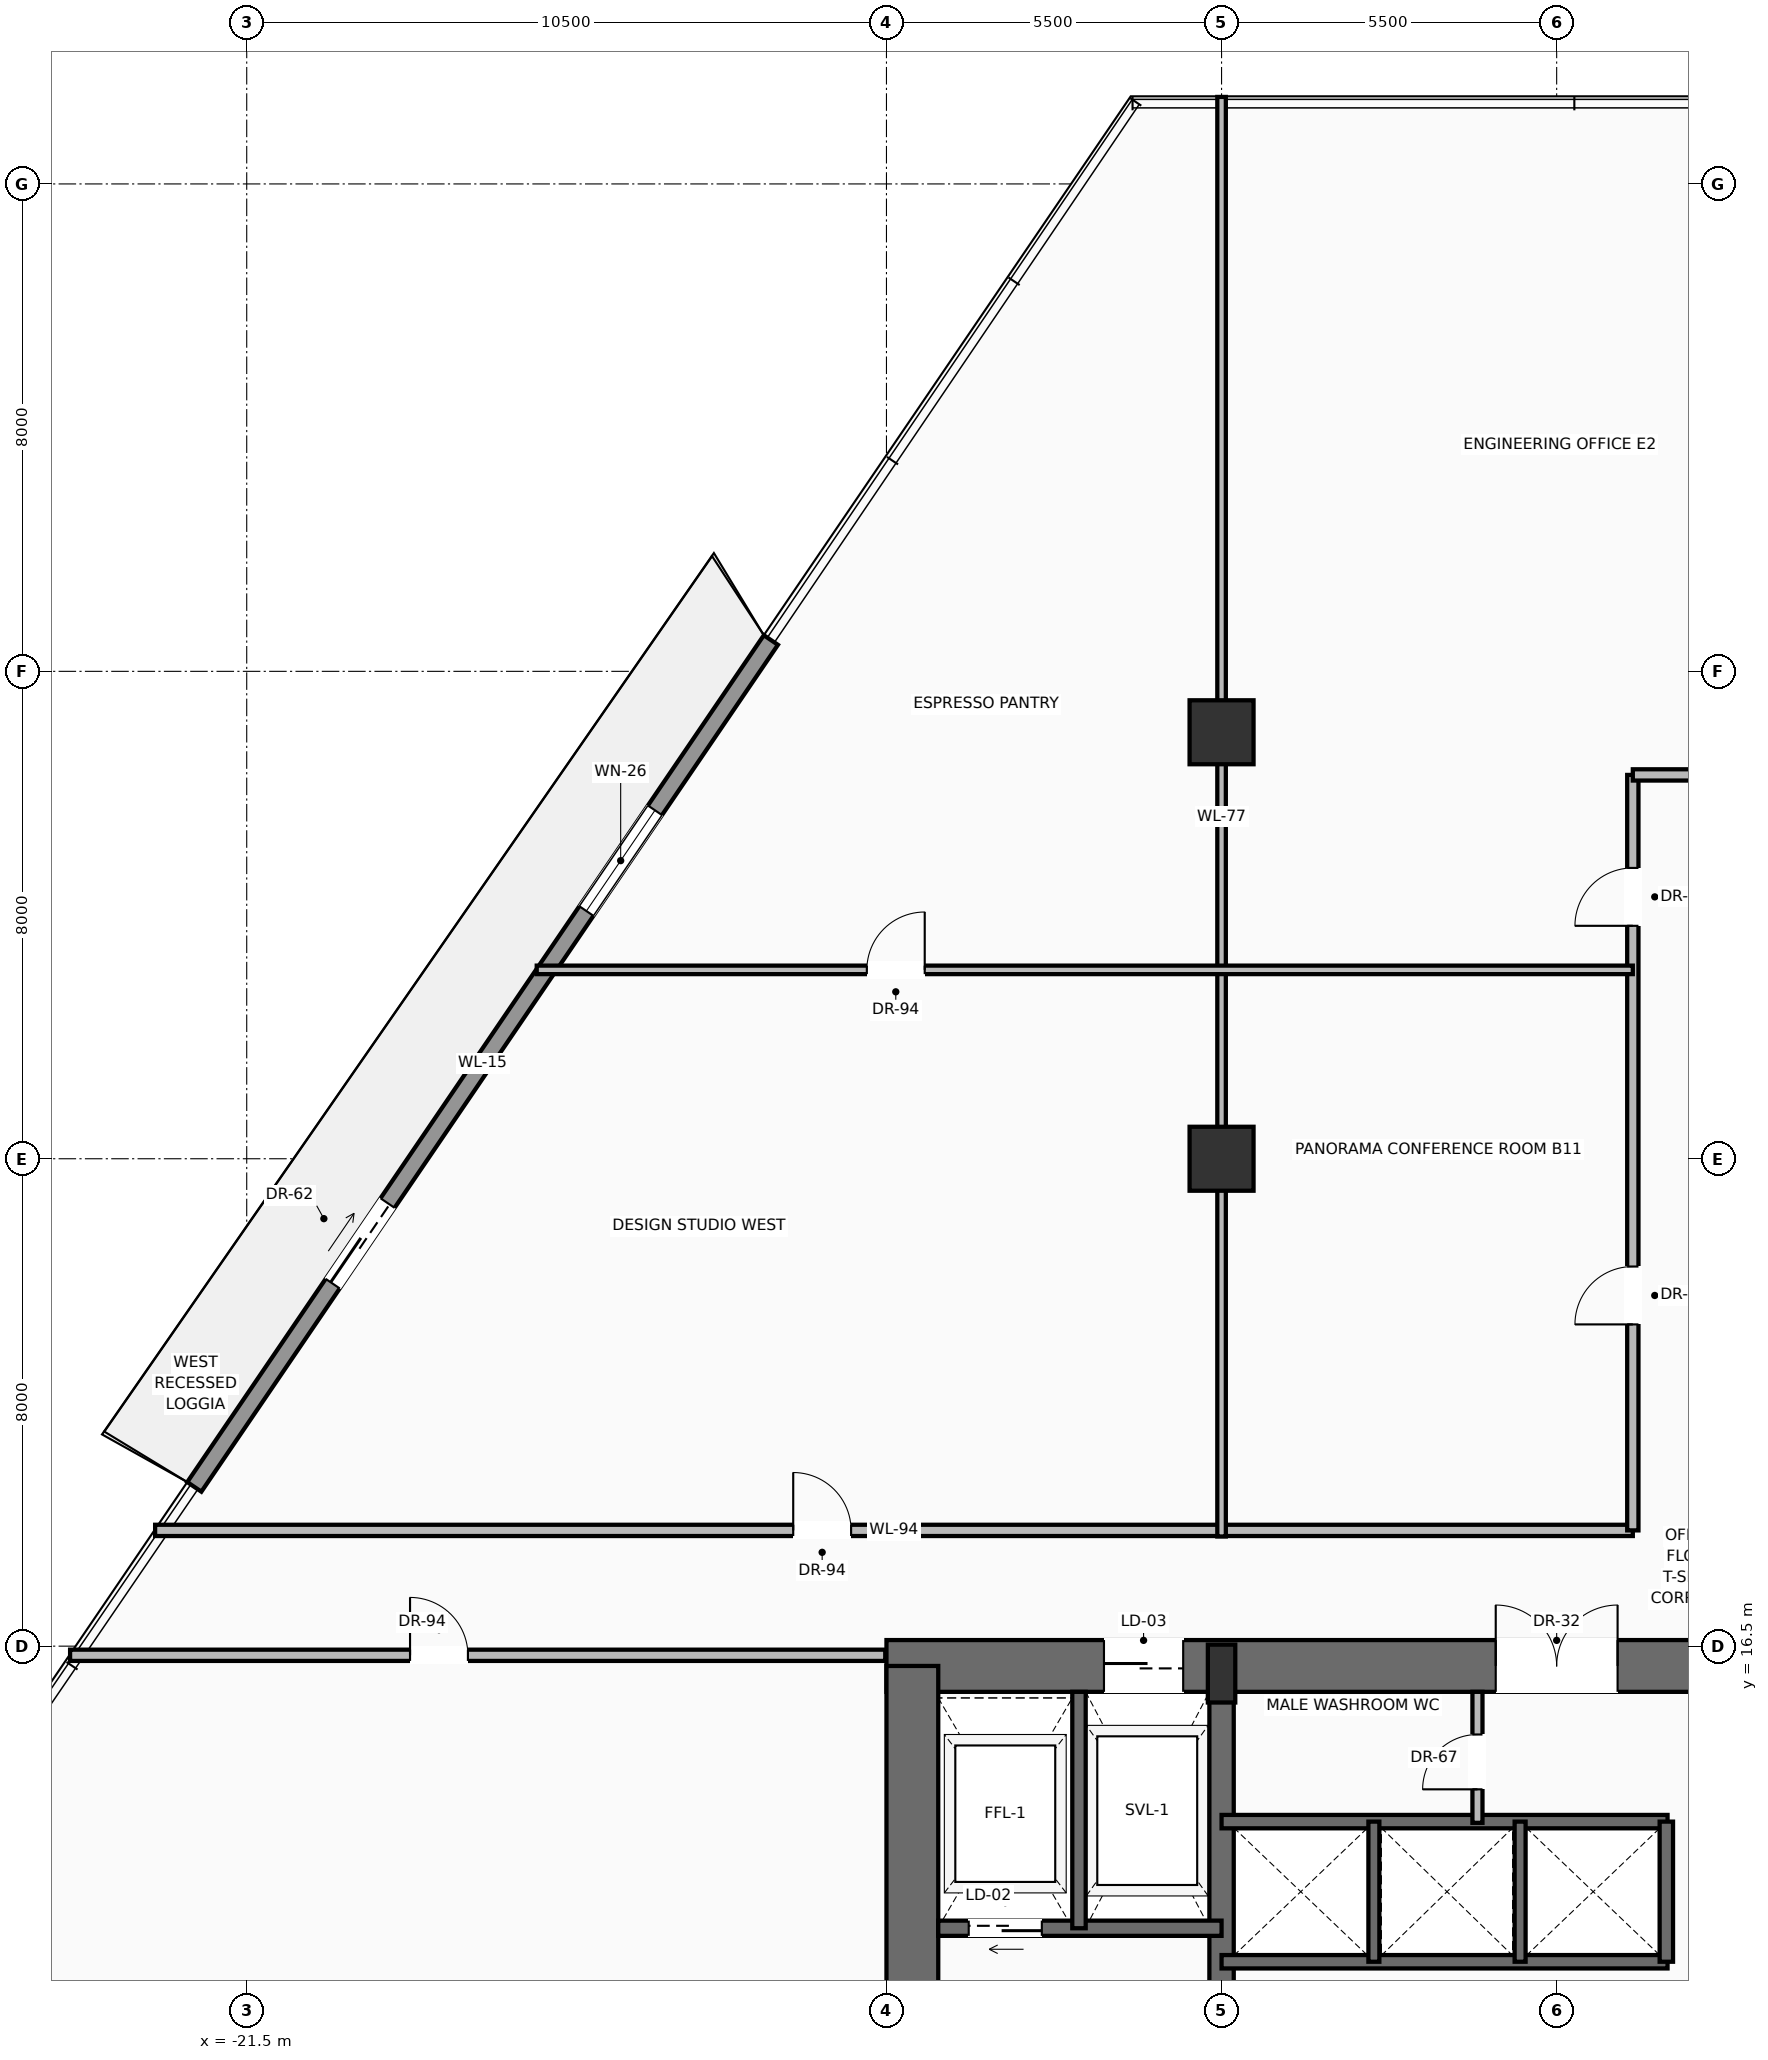
"""IFC4 building model, lengths in metres.
Left out: names, types, materials, properties, quantities, classifications, styles, units other than length and angle.
Written with IfcOpenShell. Run it as: python <this file> out.ifc"""

import sys

from ifc_helpers import new_model, si_unit, direction, frame, frame_2d, origin, origin_2d, place, context, subcontext, project, spatial, rectangle, extrude, source, transform, mapped, element, fill, save


model = new_model("IFC4")
c1 = context("Model", 3, precision=1e-05, world=origin(), true_north=direction((0.0, 1.0)))
c2 = subcontext(c1, "Body", "Model", "MODEL_VIEW")
j1 = project(units=[si_unit("LENGTHUNIT", "METRE"), si_unit("PLANEANGLEUNIT", "RADIAN")], contexts=[c1])
p1 = place(None, origin())
s1 = spatial("IfcSite", under=j1, at=p1, CompositionType="ELEMENT")
p2 = place(p1, origin())
s2 = spatial("IfcBuilding", under=s1, at=p2, CompositionType="ELEMENT")
p3 = place(p2, frame((0.0, 0.0, 53.4)))
s3 = spatial("IfcBuildingStorey", under=s2, at=p3, CompositionType="ELEMENT", Elevation=53.4)
p4 = place(p3, frame((-11.0, 16.175, 0.0), z_axis=(0.0, 0.0, 1.0), x_axis=(1.0, 0.0, 0.0)))
e1 = element("IfcWall", 1, at=p4, inside=s3, PredefinedType="SHEAR", context=c2, shape_type="SweptSolid", body=[
    extrude(rectangle(XDim=22.0, YDim=0.85, at=frame_2d((11.0, 0.0))), origin(), (0.0, 0.0, 1.0), 3.45),
])
p5 = place(p4, frame((3.57, 0.0, 0.0)))
e2 = element("IfcOpeningElement", 2, at=p5, cuts=e1, PredefinedType="OPENING", context=c2, shape_type="SweptSolid", body=[
    extrude(rectangle(XDim=1.3, YDim=2.3, at=frame_2d((0.65, 1.15))), frame((0.0, 0.435, 0.0), z_axis=(0.0, -1.0, 0.0), x_axis=(1.0, 0.0, 0.0)), (0.0, 0.0, 1.0), 0.87),
])
p6 = place(p4, frame((10.0, 0.0, 0.0)))
e3 = element("IfcOpeningElement", 3, at=p6, cuts=e1, PredefinedType="OPENING", context=c2, shape_type="SweptSolid", body=[
    extrude(rectangle(XDim=2.0, YDim=2.4, at=frame_2d((1.0, 1.2))), frame((0.0, 0.435, 0.0), z_axis=(0.0, -1.0, 0.0), x_axis=(1.0, 0.0, 0.0)), (0.0, 0.0, 1.0), 0.87),
])
p7 = place(p3, frame((-10.575, 0.425, 0.0), z_axis=(0.0, 0.0, 1.0), x_axis=(0.0, 1.0, 0.0)))
e4 = element("IfcWall", 4, at=p7, inside=s3, PredefinedType="SHEAR", context=c2, shape_type="SweptSolid", body=[
    extrude(rectangle(XDim=15.75, YDim=0.85, at=frame_2d((7.875, 0.0))), origin(), (0.0, 0.0, 1.0), 3.45),
])
p8 = place(p3, frame((-5.5, 0.425, 0.0), z_axis=(0.0, 0.0, 1.0), x_axis=(0.0, 1.0, 0.0)))
e5 = element("IfcWall", 5, at=p8, inside=s3, PredefinedType="SHEAR", context=c2, shape_type="SweptSolid", body=[
    extrude(rectangle(XDim=15.75, YDim=0.4, at=frame_2d((7.875, 0.0))), origin(), (0.0, 0.0, 1.0), 3.45),
])
p9 = place(p8, frame((9.075, 0.0, 0.0)))
e6 = element("IfcOpeningElement", 6, at=p9, cuts=e5, PredefinedType="OPENING", context=c2, shape_type="SweptSolid", body=[
    extrude(rectangle(XDim=1.1, YDim=2.2, at=frame_2d((0.55, 1.1))), frame((0.0, 0.21, 0.0), z_axis=(0.0, -1.0, 0.0), x_axis=(1.0, 0.0, 0.0)), (0.0, 0.0, 1.0), 0.42),
])
m1 = source(origin(), c2, "Body", "SweptSolid", [
    extrude(rectangle(XDim=0.45, YDim=0.95, at=origin_2d()), origin(), (0.0, 0.0, 1.0), 3.7),
])
p10 = place(p3, frame((-5.5, 16.05, 0.0), z_axis=(0.0, 0.0, 1.0), x_axis=(1.0, 0.0, 0.0)))
e7 = element("IfcColumn", 7, at=p10, inside=s3, PredefinedType="PILASTER", context=c2, shape_type="MappedRepresentation", body=[
    mapped(m1, transform((0.0, 0.0, 0.0), scale=1.0)),
])
m2 = source(origin(), c2, "Body", "SweptSolid", [
    extrude(rectangle(XDim=1.05, YDim=1.05, at=origin_2d()), origin(), (0.0, 0.0, 1.0), 3.7),
])
for number, where, z_axis, x_axis in (
    (8, (-5.5, 24.5, 0.0), (0.0, 0.0, 1.0), (1.0, 0.0, 0.0)),
    (9, (-5.5, 31.5, 0.0), (0.0, 0.0, 1.0), (1.0, 0.0, 0.0)),
):
    element("IfcColumn", number, at=place(p3, frame(where, z_axis=z_axis, x_axis=x_axis)), inside=s3, PredefinedType="COLUMN", context=c2, shape_type="MappedRepresentation", body=[
        mapped(m2, transform((0.0, 0.0, 0.0), scale=1.0)),
    ])
p11 = place(p3, frame((-22.36, 19.114, 0.0), z_axis=(0.0, 0.0, 1.0), x_axis=(0.562772191564, 0.826612037417, 0.0)))
e10 = element("IfcWall", 10, at=p11, inside=s3, PredefinedType="SOLIDWALL", context=c2, shape_type="SweptSolid", body=[
    extrude(rectangle(XDim=16.815, YDim=0.28, at=frame_2d((8.408, 0.0))), origin(), (0.0, 0.0, 1.0), 3.03),
])
p12 = place(p11, frame((4.036, 0.0, 0.0)))
e11 = element("IfcOpeningElement", 11, at=p12, cuts=e10, PredefinedType="OPENING", context=c2, shape_type="SweptSolid", body=[
    extrude(rectangle(XDim=1.6, YDim=2.35, at=frame_2d((0.8, 1.175))), frame((0.0, 0.15, 0.0), z_axis=(0.0, -1.0, 0.0), x_axis=(1.0, 0.0, 0.0)), (0.0, 0.0, 1.0), 0.3),
])
p13 = place(p11, frame((11.434, 0.0, 0.9)))
e12 = element("IfcOpeningElement", 12, at=p13, cuts=e10, PredefinedType="OPENING", context=c2, shape_type="SweptSolid", body=[
    extrude(rectangle(XDim=2.0, YDim=1.85, at=frame_2d((1.0, 0.925))), frame((0.0, 0.15, 0.0), z_axis=(0.0, -1.0, 0.0), x_axis=(1.0, 0.0, 0.0)), (0.0, 0.0, 1.0), 0.3),
])
p14 = place(p3, frame((-5.5, 11.87, 0.0), z_axis=(0.0, 0.0, 1.0), x_axis=(-1.0, 0.0, 0.0)))
e13 = element("IfcWall", 13, at=p14, inside=s3, PredefinedType="SOLIDWALL", context=c2, shape_type="SweptSolid", body=[
    extrude(rectangle(XDim=4.65, YDim=0.25, at=frame_2d((2.325, 0.0))), origin(), (0.0, 0.0, 1.0), 3.45),
])
p15 = place(p14, frame((2.95, 0.0, 0.0)))
e14 = element("IfcOpeningElement", 14, at=p15, cuts=e13, PredefinedType="OPENING", context=c2, shape_type="SweptSolid", body=[
    extrude(rectangle(XDim=1.2, YDim=2.25, at=frame_2d((0.6, 1.125))), frame((0.0, 0.135, 0.0), z_axis=(0.0, -1.0, 0.0), x_axis=(1.0, 0.0, 0.0)), (0.0, 0.0, 1.0), 0.27),
])
p16 = place(p3, frame((-7.84, 11.87, 0.0), z_axis=(0.0, 0.0, 1.0), x_axis=(0.0, 1.0, 0.0)))
e15 = element("IfcWall", 15, at=p16, inside=s3, PredefinedType="SOLIDWALL", context=c2, shape_type="SweptSolid", body=[
    extrude(rectangle(XDim=3.88, YDim=0.22, at=frame_2d((1.94, 0.0))), origin(), (0.0, 0.0, 1.0), 3.45),
])
for number, where, z_axis, x_axis in (
    (16, (-5.5, 11.32, 0.0), (0.0, 0.0, 1.0), (1.0, 0.0, 0.0)),
    (17, (-5.5, 13.62, 0.0), (0.0, 0.0, 1.0), (1.0, 0.0, 0.0)),
):
    element("IfcWall", number, at=place(p3, frame(where, z_axis=z_axis, x_axis=x_axis)), inside=s3, PredefinedType="SOLIDWALL", context=c2, shape_type="SweptSolid", body=[
        extrude(rectangle(XDim=7.32, YDim=0.22, at=frame_2d((3.66, 0.0))), origin(), (0.0, 0.0, 1.0), 3.45),
    ])
p17 = place(p3, frame((1.8, 11.32, 0.0), z_axis=(0.0, 0.0, 1.0), x_axis=(0.0, 1.0, 0.0)))
e18 = element("IfcWall", 18, at=p17, inside=s3, PredefinedType="SOLIDWALL", context=c2, shape_type="SweptSolid", body=[
    extrude(rectangle(XDim=2.3, YDim=0.22, at=frame_2d((1.15, 0.0))), origin(), (0.0, 0.0, 1.0), 3.45),
])
for number, where, z_axis, x_axis in (
    (19, (-3.0, 11.32, 0.0), (0.0, 0.0, 1.0), (0.0, 1.0, 0.0)),
    (20, (-0.6, 11.32, 0.0), (0.0, 0.0, 1.0), (0.0, 1.0, 0.0)),
):
    element("IfcWall", number, at=place(p3, frame(where, z_axis=z_axis, x_axis=x_axis)), inside=s3, PredefinedType="SOLIDWALL", context=c2, shape_type="SweptSolid", body=[
        extrude(rectangle(XDim=2.3, YDim=0.18, at=frame_2d((1.15, 0.0))), origin(), (0.0, 0.0, 1.0), 3.45),
    ])
p18 = place(p3, frame((-1.3, 13.6, 0.0), z_axis=(0.0, 0.0, 1.0), x_axis=(0.0, 1.0, 0.0)))
e21 = element("IfcWall", 21, at=p18, inside=s3, PredefinedType="PARTITIONING", context=c2, shape_type="SweptSolid", body=[
    extrude(rectangle(XDim=2.15, YDim=0.165, at=frame_2d((1.075, 0.0))), origin(), (0.0, 0.0, 1.0), 3.442),
])
p19 = place(p18, frame((0.55, 0.0, 0.0)))
e22 = element("IfcOpeningElement", 22, at=p19, cuts=e21, PredefinedType="OPENING", context=c2, shape_type="SweptSolid", body=[
    extrude(rectangle(XDim=0.9, YDim=2.1, at=frame_2d((0.45, 1.05))), frame((0.0, 0.093, 0.0), z_axis=(0.0, -1.0, 0.0), x_axis=(1.0, 0.0, 0.0)), (0.0, 0.0, 1.0), 0.185),
])
p20 = place(p3, frame((-24.399, 16.35, 0.0), z_axis=(0.0, 0.0, 1.0), x_axis=(1.0, 0.0, 0.0)))
e23 = element("IfcWall", 23, at=p20, inside=s3, PredefinedType="PARTITIONING", context=c2, shape_type="SweptSolid", body=[
    extrude(rectangle(XDim=13.379, YDim=0.185, at=frame_2d((6.689, 0.0))), origin(), (0.0, 0.0, 1.0), 2.747),
])
p21 = place(p20, frame((5.58, 0.0, 0.0)))
e24 = element("IfcOpeningElement", 24, at=p21, cuts=e23, PredefinedType="OPENING", context=c2, shape_type="SweptSolid", body=[
    extrude(rectangle(XDim=0.95, YDim=2.2, at=frame_2d((0.475, 1.1))), frame((0.0, 0.103, 0.0), z_axis=(0.0, -1.0, 0.0), x_axis=(1.0, 0.0, 0.0)), (0.0, 0.0, 1.0), 0.205),
])
p22 = place(p3, frame((-23.003, 18.4, 0.0), z_axis=(0.0, 0.0, 1.0), x_axis=(1.0, 0.0, 0.0)))
e25 = element("IfcWall", 25, at=p22, inside=s3, PredefinedType="PARTITIONING", context=c2, shape_type="SweptSolid", body=[
    extrude(rectangle(XDim=24.253, YDim=0.185, at=frame_2d((12.127, 0.0))), origin(), (0.0, 0.0, 1.0), 2.747),
])
p23 = place(p22, frame((10.473, 0.0, 0.0)))
e26 = element("IfcOpeningElement", 26, at=p23, cuts=e25, PredefinedType="OPENING", context=c2, shape_type="SweptSolid", body=[
    extrude(rectangle(XDim=0.95, YDim=2.2, at=frame_2d((0.475, 1.1))), frame((0.0, 0.103, 0.0), z_axis=(0.0, -1.0, 0.0), x_axis=(1.0, 0.0, 0.0)), (0.0, 0.0, 1.0), 0.205),
])
p24 = place(p3, frame((1.25, 18.4, 0.0), z_axis=(0.0, 0.0, 1.0), x_axis=(0.0, 1.0, 0.0)))
e27 = element("IfcWall", 27, at=p24, inside=s3, PredefinedType="PARTITIONING", context=c2, shape_type="SweptSolid", body=[
    extrude(rectangle(XDim=12.4, YDim=0.185, at=frame_2d((6.2, 0.0))), origin(), (0.0, 0.0, 1.0), 2.747),
])
p25 = place(p24, frame((3.381, 0.0, 0.0)))
e28 = element("IfcOpeningElement", 28, at=p25, cuts=e27, PredefinedType="OPENING", context=c2, shape_type="SweptSolid", body=[
    extrude(rectangle(XDim=0.95, YDim=2.2, at=frame_2d((0.475, 1.1))), frame((0.0, 0.103, 0.0), z_axis=(0.0, -1.0, 0.0), x_axis=(1.0, 0.0, 0.0)), (0.0, 0.0, 1.0), 0.205),
])
p26 = place(p24, frame((9.923, 0.0, 0.0)))
e29 = element("IfcOpeningElement", 29, at=p26, cuts=e27, PredefinedType="OPENING", context=c2, shape_type="SweptSolid", body=[
    extrude(rectangle(XDim=0.95, YDim=2.2, at=frame_2d((0.475, 1.1))), frame((0.0, 0.103, 0.0), z_axis=(0.0, -1.0, 0.0), x_axis=(1.0, 0.0, 0.0)), (0.0, 0.0, 1.0), 0.205),
])
p27 = place(p3, frame((1.25, 30.8, 0.0), z_axis=(0.0, 0.0, 1.0), x_axis=(1.0, 0.0, 0.0)))
e30 = element("IfcWall", 30, at=p27, inside=s3, PredefinedType="PARTITIONING", context=c2, shape_type="SweptSolid", body=[
    extrude(rectangle(XDim=2.1, YDim=0.185, at=frame_2d((1.05, 0.0))), origin(), (0.0, 0.0, 1.0), 3.442),
])
p28 = place(p3, frame((-5.5, 18.3, 0.0), z_axis=(0.0, 0.0, 1.0), x_axis=(0.0, 1.0, 0.0)))
e31 = element("IfcWall", 31, at=p28, inside=s3, PredefinedType="PARTITIONING", context=c2, shape_type="SweptSolid", body=[
    extrude(rectangle(XDim=23.628, YDim=0.14, at=frame_2d((11.814, 0.0))), origin(), (0.0, 0.0, 1.0), 2.747),
])
p29 = place(p3, frame((-16.74, 27.6, 0.0), z_axis=(0.0, 0.0, 1.0), x_axis=(1.0, 0.0, 0.0)))
e32 = element("IfcWall", 32, at=p29, inside=s3, PredefinedType="PARTITIONING", context=c2, shape_type="SweptSolid", body=[
    extrude(rectangle(XDim=17.99, YDim=0.14, at=frame_2d((8.995, 0.0))), origin(), (0.0, 0.0, 1.0), 2.747),
])
p30 = place(p29, frame((5.418, 0.0, 0.0)))
e33 = element("IfcOpeningElement", 33, at=p30, cuts=e32, PredefinedType="OPENING", context=c2, shape_type="SweptSolid", body=[
    extrude(rectangle(XDim=0.95, YDim=2.2, at=frame_2d((0.475, 1.1))), frame((0.0, 0.08, 0.0), z_axis=(0.0, -1.0, 0.0), x_axis=(1.0, 0.0, 0.0)), (0.0, 0.0, 1.0), 0.16),
])
m3 = source(origin(), c2, "Body", "SweptSolid", [
    extrude(rectangle(XDim=1.6, YDim=2.35, at=frame_2d((0.8, 1.175))), frame((0.0, 0.025, 0.0), z_axis=(0.0, -1.0, 0.0), x_axis=(1.0, 0.0, 0.0)), (0.0, 0.0, 1.0), 0.05),
])
p31 = place(p12, origin())
e34 = element("IfcDoor", 34, at=p31, inside=s3, OperationType="SLIDING_TO_LEFT", PredefinedType="DOOR", context=c2, shape_type="MappedRepresentation", body=[
    mapped(m3, transform((0.0, 0.0, 0.0), scale=1.0)),
])
fill(e11, e34)
m4 = source(origin(), c2, "Body", "SweptSolid", [
    extrude(rectangle(XDim=2.0, YDim=1.85, at=frame_2d((1.0, 0.925))), frame((0.0, 0.03, 0.0), z_axis=(0.0, -1.0, 0.0), x_axis=(1.0, 0.0, 0.0)), (0.0, 0.0, 1.0), 0.06),
])
p32 = place(p13, origin())
e35 = element("IfcWindow", 35, at=p32, inside=s3, PartitioningType="SINGLE_PANEL", PredefinedType="WINDOW", context=c2, shape_type="MappedRepresentation", body=[
    mapped(m4, transform((0.0, 0.0, 0.0), scale=1.0)),
])
fill(e12, e35)
m5 = source(origin(), c2, "Body", "SweptSolid", [
    extrude(rectangle(XDim=1.2, YDim=2.25, at=frame_2d((0.6, 1.125))), frame((0.0, 0.025, 0.0), z_axis=(0.0, -1.0, 0.0), x_axis=(1.0, 0.0, 0.0)), (0.0, 0.0, 1.0), 0.05),
])
p33 = place(p15, origin())
e36 = element("IfcDoor", 36, at=p33, inside=s3, OperationType="SLIDING_TO_LEFT", PredefinedType="DOOR", context=c2, shape_type="MappedRepresentation", body=[
    mapped(m5, transform((0.0, 0.0, 0.0), scale=1.0)),
])
fill(e14, e36)
m6 = source(origin(), c2, "Body", "SweptSolid", [
    extrude(rectangle(XDim=1.3, YDim=2.3, at=frame_2d((0.65, 1.15))), frame((0.0, 0.025, 0.0), z_axis=(0.0, -1.0, 0.0), x_axis=(1.0, 0.0, 0.0)), (0.0, 0.0, 1.0), 0.05),
])
p34 = place(p5, origin())
e37 = element("IfcDoor", 37, at=p34, inside=s3, OperationType="SLIDING_TO_RIGHT", PredefinedType="DOOR", context=c2, shape_type="MappedRepresentation", body=[
    mapped(m6, transform((0.0, 0.0, 0.0), scale=1.0)),
])
fill(e2, e37)
m7 = source(origin(), c2, "Body", "SweptSolid", [
    extrude(rectangle(XDim=2.0, YDim=2.4, at=frame_2d((1.0, 1.2))), frame((0.0, 0.025, 0.0), z_axis=(0.0, -1.0, 0.0), x_axis=(1.0, 0.0, 0.0)), (0.0, 0.0, 1.0), 0.05),
])
p35 = place(p6, origin())
e38 = element("IfcDoor", 38, at=p35, inside=s3, OperationType="DOUBLE_DOOR_SINGLE_SWING", PredefinedType="DOOR", context=c2, shape_type="MappedRepresentation", body=[
    mapped(m7, transform((0.0, 0.0, 0.0), scale=1.0)),
])
fill(e3, e38)
m8 = source(origin(), c2, "Body", "SweptSolid", [
    extrude(rectangle(XDim=0.9, YDim=2.1, at=frame_2d((0.45, 1.05))), frame((0.0, 0.025, 0.0), z_axis=(0.0, -1.0, 0.0), x_axis=(1.0, 0.0, 0.0)), (0.0, 0.0, 1.0), 0.05),
])
p36 = place(p19, origin())
e39 = element("IfcDoor", 39, at=p36, inside=s3, OperationType="SINGLE_SWING_LEFT", PredefinedType="DOOR", context=c2, shape_type="MappedRepresentation", body=[
    mapped(m8, transform((0.0, 0.0, 0.0), scale=1.0)),
])
fill(e22, e39)
m9 = source(origin(), c2, "Body", "SweptSolid", [
    extrude(rectangle(XDim=0.95, YDim=2.2, at=frame_2d((0.475, 1.1))), frame((0.0, 0.025, 0.0), z_axis=(0.0, -1.0, 0.0), x_axis=(1.0, 0.0, 0.0)), (0.0, 0.0, 1.0), 0.05),
])
p37 = place(p21, origin())
e40 = element("IfcDoor", 40, at=p37, inside=s3, OperationType="SINGLE_SWING_LEFT", PredefinedType="DOOR", context=c2, shape_type="MappedRepresentation", body=[
    mapped(m9, transform((0.0, 0.0, 0.0), scale=1.0)),
])
fill(e24, e40)
p38 = place(p23, origin())
e41 = element("IfcDoor", 41, at=p38, inside=s3, OperationType="SINGLE_SWING_LEFT", PredefinedType="DOOR", context=c2, shape_type="MappedRepresentation", body=[
    mapped(m9, transform((0.0, 0.0, 0.0), scale=1.0)),
])
fill(e26, e41)
p39 = place(p25, origin())
e42 = element("IfcDoor", 42, at=p39, inside=s3, OperationType="SINGLE_SWING_LEFT", PredefinedType="DOOR", context=c2, shape_type="MappedRepresentation", body=[
    mapped(m9, transform((0.0, 0.0, 0.0), scale=1.0)),
])
fill(e28, e42)
p40 = place(p30, origin())
e43 = element("IfcDoor", 43, at=p40, inside=s3, OperationType="SINGLE_SWING_RIGHT", PredefinedType="DOOR", context=c2, shape_type="MappedRepresentation", body=[
    mapped(m9, transform((0.0, 0.0, 0.0), scale=1.0)),
])
fill(e33, e43)
p41 = place(p26, origin())
e44 = element("IfcDoor", 44, at=p41, inside=s3, OperationType="SINGLE_SWING_LEFT", PredefinedType="DOOR", context=c2, shape_type="MappedRepresentation", body=[
    mapped(m9, transform((0.0, 0.0, 0.0), scale=1.0)),
])
fill(e29, e44)
save(model, sys.argv[1])
